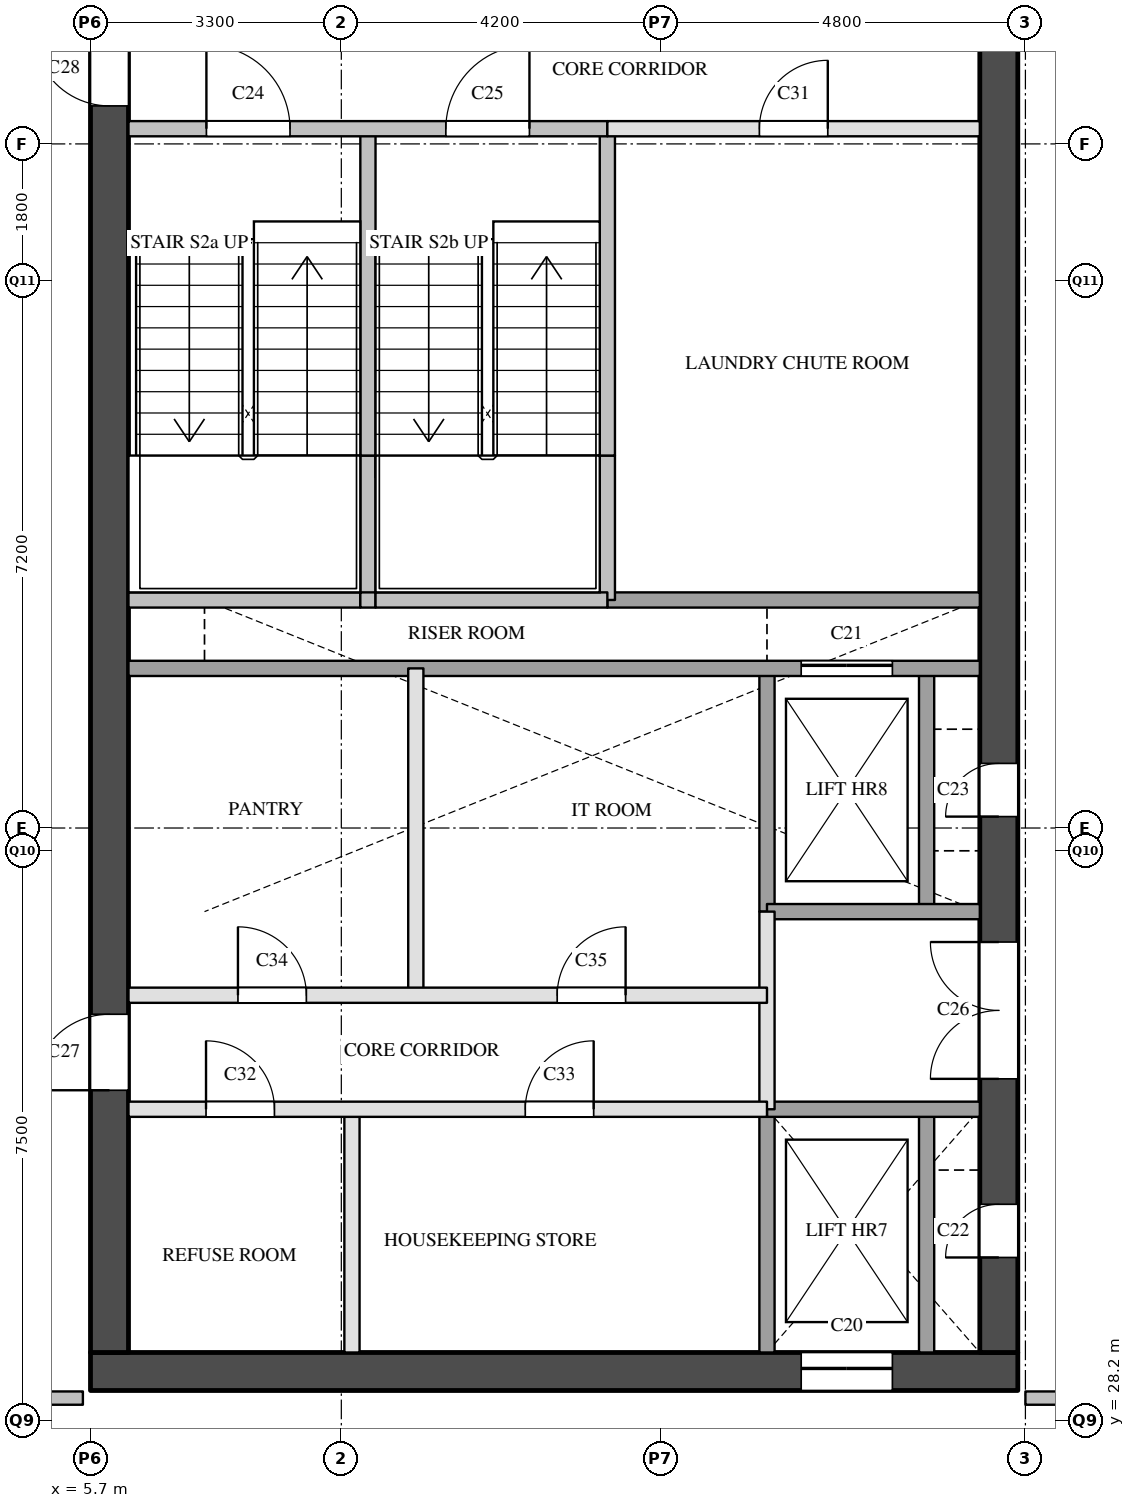
"""IFC4 building model, lengths in metres.
Left out: names, types, materials, properties, quantities, classifications, styles, units other than length and angle.
Written with IfcOpenShell. Run it as: python <this file> out.ifc"""

import sys

from ifc_helpers import new_model, si_unit, direction, frame, frame_2d, origin, place, context, subcontext, project, spatial, rectangle, extrude, element, fill, save


model = new_model("IFC4")
c1 = context("Model", 3, precision=1e-05, world=origin(), true_north=direction((0.0, 1.0)))
c2 = subcontext(c1, "Body", "Model", "MODEL_VIEW")
j1 = project(units=[si_unit("LENGTHUNIT", "METRE"), si_unit("PLANEANGLEUNIT", "RADIAN")], contexts=[c1])
p1 = place(None, origin())
s1 = spatial("IfcSite", under=j1, at=p1, CompositionType="ELEMENT")
p2 = place(p1, origin())
s2 = spatial("IfcBuilding", under=s1, at=p2, CompositionType="ELEMENT")
p3 = place(p2, frame((0.0, 0.0, 181.7)))
s3 = spatial("IfcBuildingStorey", under=s2, at=p3, CompositionType="ELEMENT", Elevation=181.7)
p4 = place(p3, frame((5.7, 28.85, 0.0), z_axis=(0.0, 0.0, 1.0), x_axis=(1.0, 0.0, 0.0)))
e1 = element("IfcWall", 1, at=p4, inside=s3, PredefinedType="SHEAR", context=c2, shape_type="SweptSolid", body=[
    extrude(rectangle(XDim=12.2, YDim=0.5, at=frame_2d((6.1, 0.0))), origin(), (0.0, 0.0, 1.0), 3.6),
])
p5 = place(p4, frame((9.35, 0.0, 0.0)))
e2 = element("IfcOpeningElement", 2, at=p5, cuts=e1, PredefinedType="OPENING", context=c2, shape_type="SweptSolid", body=[
    extrude(rectangle(XDim=1.2, YDim=2.1, at=frame_2d((0.6, 1.05))), frame((0.0, 0.26, 0.0), z_axis=(0.0, -1.0, 0.0), x_axis=(1.0, 0.0, 0.0)), (0.0, 0.0, 1.0), 0.52),
])
p6 = place(p3, frame((5.95, 29.1, 0.0), z_axis=(0.0, 0.0, 1.0), x_axis=(0.0, 1.0, 0.0)))
e3 = element("IfcWall", 3, at=p6, inside=s3, PredefinedType="SHEAR", context=c2, shape_type="SweptSolid", body=[
    extrude(rectangle(XDim=20.3, YDim=0.5, at=frame_2d((10.15, 0.0))), origin(), (0.0, 0.0, 1.0), 3.6),
])
p7 = place(p6, frame((3.45, 0.0, 0.0)))
e4 = element("IfcOpeningElement", 4, at=p7, cuts=e3, PredefinedType="OPENING", context=c2, shape_type="SweptSolid", body=[
    extrude(rectangle(XDim=1.0, YDim=2.1, at=frame_2d((0.5, 1.05))), frame((0.0, 0.26, 0.0), z_axis=(0.0, -1.0, 0.0), x_axis=(1.0, 0.0, 0.0)), (0.0, 0.0, 1.0), 0.52),
])
p8 = place(p6, frame((16.4, 0.0, 0.0)))
e5 = element("IfcOpeningElement", 5, at=p8, cuts=e3, PredefinedType="OPENING", context=c2, shape_type="SweptSolid", body=[
    extrude(rectangle(XDim=1.0, YDim=2.1, at=frame_2d((0.5, 1.05))), frame((0.0, 0.26, 0.0), z_axis=(0.0, -1.0, 0.0), x_axis=(1.0, 0.0, 0.0)), (0.0, 0.0, 1.0), 0.52),
])
p9 = place(p3, frame((17.65, 29.1, 0.0), z_axis=(0.0, 0.0, 1.0), x_axis=(0.0, 1.0, 0.0)))
e6 = element("IfcWall", 6, at=p9, inside=s3, PredefinedType="SHEAR", context=c2, shape_type="SweptSolid", body=[
    extrude(rectangle(XDim=20.3, YDim=0.5, at=frame_2d((10.15, 0.0))), origin(), (0.0, 0.0, 1.0), 3.6),
])
p10 = place(p9, frame((1.25, 0.0, 0.0)))
e7 = element("IfcOpeningElement", 7, at=p10, cuts=e6, PredefinedType="OPENING", context=c2, shape_type="SweptSolid", body=[
    extrude(rectangle(XDim=0.7, YDim=2.1, at=frame_2d((0.35, 1.05))), frame((0.0, 0.26, 0.0), z_axis=(0.0, -1.0, 0.0), x_axis=(1.0, 0.0, 0.0)), (0.0, 0.0, 1.0), 0.52),
])
p11 = place(p9, frame((7.05, 0.0, 0.0)))
e8 = element("IfcOpeningElement", 8, at=p11, cuts=e6, PredefinedType="OPENING", context=c2, shape_type="SweptSolid", body=[
    extrude(rectangle(XDim=0.7, YDim=2.1, at=frame_2d((0.35, 1.05))), frame((0.0, 0.26, 0.0), z_axis=(0.0, -1.0, 0.0), x_axis=(1.0, 0.0, 0.0)), (0.0, 0.0, 1.0), 0.52),
])
p12 = place(p9, frame((3.6, 0.0, 0.0)))
e9 = element("IfcOpeningElement", 9, at=p12, cuts=e6, PredefinedType="OPENING", context=c2, shape_type="SweptSolid", body=[
    extrude(rectangle(XDim=1.8, YDim=2.1, at=frame_2d((0.9, 1.05))), frame((0.0, 0.26, 0.0), z_axis=(0.0, -1.0, 0.0), x_axis=(1.0, 0.0, 0.0)), (0.0, 0.0, 1.0), 0.52),
])
p13 = place(p3, frame((9.14, 29.1, 0.0), z_axis=(0.0, 0.0, 1.0), x_axis=(0.0, 1.0, 0.0)))
e10 = element("IfcWall", 10, at=p13, inside=s3, PredefinedType="PARTITIONING", context=c2, shape_type="SweptSolid", body=[
    extrude(rectangle(XDim=3.2, YDim=0.2, at=frame_2d((1.6, 0.0))), origin(), (0.0, 0.0, 1.0), 3.6),
])
p14 = place(p3, frame((9.35, 39.0, 0.0), z_axis=(0.0, 0.0, 1.0), x_axis=(0.0, 1.0, 0.0)))
e11 = element("IfcWall", 11, at=p14, inside=s3, PredefinedType="SOLIDWALL", context=c2, shape_type="SweptSolid", body=[
    extrude(rectangle(XDim=1.9, YDim=0.2, at=frame_2d((0.95, 0.0))), origin(), (0.0, 0.0, 1.0), 3.6),
])
p15 = place(p3, frame((9.35, 40.9, 0.0), z_axis=(0.0, 0.0, 1.0), x_axis=(0.0, 1.0, 0.0)))
e12 = element("IfcWall", 12, at=p15, inside=s3, PredefinedType="SOLIDWALL", context=c2, shape_type="SweptSolid", body=[
    extrude(rectangle(XDim=4.3, YDim=0.2, at=frame_2d((2.15, 0.0))), origin(), (0.0, 0.0, 1.0), 3.6),
])
p16 = place(p3, frame((9.98, 33.8, 0.0), z_axis=(0.0, 0.0, 1.0), x_axis=(0.0, 1.0, 0.0)))
e13 = element("IfcWall", 13, at=p16, inside=s3, PredefinedType="PARTITIONING", context=c2, shape_type="SweptSolid", body=[
    extrude(rectangle(XDim=4.3, YDim=0.2, at=frame_2d((2.15, 0.0))), origin(), (0.0, 0.0, 1.0), 3.6),
])
p17 = place(p3, frame((12.5, 39.0, 0.0), z_axis=(0.0, 0.0, 1.0), x_axis=(0.0, 1.0, 0.0)))
e14 = element("IfcWall", 14, at=p17, inside=s3, PredefinedType="SOLIDWALL", context=c2, shape_type="SweptSolid", body=[
    extrude(rectangle(XDim=1.9, YDim=0.2, at=frame_2d((0.95, 0.0))), origin(), (0.0, 0.0, 1.0), 3.6),
])
p18 = place(p3, frame((12.5, 40.9, 0.0), z_axis=(0.0, 0.0, 1.0), x_axis=(0.0, 1.0, 0.0)))
e15 = element("IfcWall", 15, at=p18, inside=s3, PredefinedType="SOLIDWALL", context=c2, shape_type="SweptSolid", body=[
    extrude(rectangle(XDim=4.3, YDim=0.2, at=frame_2d((2.15, 0.0))), origin(), (0.0, 0.0, 1.0), 3.6),
])
p19 = place(p3, frame((14.6, 32.3, 0.0), z_axis=(0.0, 0.0, 1.0), x_axis=(0.0, 1.0, 0.0)))
e16 = element("IfcWall", 16, at=p19, inside=s3, PredefinedType="PARTITIONING", context=c2, shape_type="SweptSolid", body=[
    extrude(rectangle(XDim=2.6, YDim=0.2, at=frame_2d((1.3, 0.0))), origin(), (0.0, 0.0, 1.0), 3.6),
])
p20 = place(p3, frame((14.6, 29.1, 0.0), z_axis=(0.0, 0.0, 1.0), x_axis=(0.0, 1.0, 0.0)))
e17 = element("IfcWall", 17, at=p20, inside=s3, PredefinedType="SOLIDWALL", context=c2, shape_type="SweptSolid", body=[
    extrude(rectangle(XDim=3.2, YDim=0.2, at=frame_2d((1.6, 0.0))), origin(), (0.0, 0.0, 1.0), 3.6),
])
p21 = place(p3, frame((14.6, 34.9, 0.0), z_axis=(0.0, 0.0, 1.0), x_axis=(0.0, 1.0, 0.0)))
e18 = element("IfcWall", 18, at=p21, inside=s3, PredefinedType="SOLIDWALL", context=c2, shape_type="SweptSolid", body=[
    extrude(rectangle(XDim=3.2, YDim=0.2, at=frame_2d((1.6, 0.0))), origin(), (0.0, 0.0, 1.0), 3.6),
])
p22 = place(p3, frame((16.7, 29.1, 0.0), z_axis=(0.0, 0.0, 1.0), x_axis=(0.0, 1.0, 0.0)))
e19 = element("IfcWall", 19, at=p22, inside=s3, PredefinedType="SOLIDWALL", context=c2, shape_type="SweptSolid", body=[
    extrude(rectangle(XDim=3.2, YDim=0.2, at=frame_2d((1.6, 0.0))), origin(), (0.0, 0.0, 1.0), 3.6),
])
p23 = place(p3, frame((16.7, 34.9, 0.0), z_axis=(0.0, 0.0, 1.0), x_axis=(0.0, 1.0, 0.0)))
e20 = element("IfcWall", 20, at=p23, inside=s3, PredefinedType="SOLIDWALL", context=c2, shape_type="SweptSolid", body=[
    extrude(rectangle(XDim=3.2, YDim=0.2, at=frame_2d((1.6, 0.0))), origin(), (0.0, 0.0, 1.0), 3.6),
])
p24 = place(p3, frame((6.2, 32.3, 0.0), z_axis=(0.0, 0.0, 1.0), x_axis=(1.0, 0.0, 0.0)))
e21 = element("IfcWall", 21, at=p24, inside=s3, PredefinedType="PARTITIONING", context=c2, shape_type="SweptSolid", body=[
    extrude(rectangle(XDim=8.4, YDim=0.2, at=frame_2d((4.2, 0.0))), origin(), (0.0, 0.0, 1.0), 3.6),
])
p25 = place(p24, frame((1.02, 0.0, 0.0)))
e22 = element("IfcOpeningElement", 22, at=p25, cuts=e21, PredefinedType="OPENING", context=c2, shape_type="SweptSolid", body=[
    extrude(rectangle(XDim=0.9, YDim=2.1, at=frame_2d((0.45, 1.05))), frame((0.0, 0.11, 0.0), z_axis=(0.0, -1.0, 0.0), x_axis=(1.0, 0.0, 0.0)), (0.0, 0.0, 1.0), 0.22),
])
p26 = place(p24, frame((5.22, 0.0, 0.0)))
e23 = element("IfcOpeningElement", 23, at=p26, cuts=e21, PredefinedType="OPENING", context=c2, shape_type="SweptSolid", body=[
    extrude(rectangle(XDim=0.9, YDim=2.1, at=frame_2d((0.45, 1.05))), frame((0.0, 0.11, 0.0), z_axis=(0.0, -1.0, 0.0), x_axis=(1.0, 0.0, 0.0)), (0.0, 0.0, 1.0), 0.22),
])
p27 = place(p3, frame((14.6, 32.3, 0.0), z_axis=(0.0, 0.0, 1.0), x_axis=(1.0, 0.0, 0.0)))
e24 = element("IfcWall", 24, at=p27, inside=s3, PredefinedType="SOLIDWALL", context=c2, shape_type="SweptSolid", body=[
    extrude(rectangle(XDim=2.8, YDim=0.2, at=frame_2d((1.4, 0.0))), origin(), (0.0, 0.0, 1.0), 3.6),
])
p28 = place(p3, frame((6.2, 33.8, 0.0), z_axis=(0.0, 0.0, 1.0), x_axis=(1.0, 0.0, 0.0)))
e25 = element("IfcWall", 25, at=p28, inside=s3, PredefinedType="PARTITIONING", context=c2, shape_type="SweptSolid", body=[
    extrude(rectangle(XDim=8.4, YDim=0.2, at=frame_2d((4.2, 0.0))), origin(), (0.0, 0.0, 1.0), 3.6),
])
p29 = place(p28, frame((1.44, 0.0, 0.0)))
e26 = element("IfcOpeningElement", 26, at=p29, cuts=e25, PredefinedType="OPENING", context=c2, shape_type="SweptSolid", body=[
    extrude(rectangle(XDim=0.9, YDim=2.1, at=frame_2d((0.45, 1.05))), frame((0.0, 0.11, 0.0), z_axis=(0.0, -1.0, 0.0), x_axis=(1.0, 0.0, 0.0)), (0.0, 0.0, 1.0), 0.22),
])
p30 = place(p28, frame((5.64, 0.0, 0.0)))
e27 = element("IfcOpeningElement", 27, at=p30, cuts=e25, PredefinedType="OPENING", context=c2, shape_type="SweptSolid", body=[
    extrude(rectangle(XDim=0.9, YDim=2.1, at=frame_2d((0.45, 1.05))), frame((0.0, 0.11, 0.0), z_axis=(0.0, -1.0, 0.0), x_axis=(1.0, 0.0, 0.0)), (0.0, 0.0, 1.0), 0.22),
])
p31 = place(p3, frame((14.6, 34.9, 0.0), z_axis=(0.0, 0.0, 1.0), x_axis=(1.0, 0.0, 0.0)))
e28 = element("IfcWall", 28, at=p31, inside=s3, PredefinedType="SOLIDWALL", context=c2, shape_type="SweptSolid", body=[
    extrude(rectangle(XDim=2.8, YDim=0.2, at=frame_2d((1.4, 0.0))), origin(), (0.0, 0.0, 1.0), 3.6),
])
p32 = place(p3, frame((6.2, 38.1, 0.0), z_axis=(0.0, 0.0, 1.0), x_axis=(1.0, 0.0, 0.0)))
e29 = element("IfcWall", 29, at=p32, inside=s3, PredefinedType="SOLIDWALL", context=c2, shape_type="SweptSolid", body=[
    extrude(rectangle(XDim=11.2, YDim=0.2, at=frame_2d((5.6, 0.0))), origin(), (0.0, 0.0, 1.0), 3.6),
])
p33 = place(p32, frame((8.85, 0.0, 0.0)))
e30 = element("IfcOpeningElement", 30, at=p33, cuts=e29, PredefinedType="OPENING", context=c2, shape_type="SweptSolid", body=[
    extrude(rectangle(XDim=1.2, YDim=2.1, at=frame_2d((0.6, 1.05))), frame((0.0, 0.11, 0.0), z_axis=(0.0, -1.0, 0.0), x_axis=(1.0, 0.0, 0.0)), (0.0, 0.0, 1.0), 0.22),
])
p34 = place(p3, frame((12.5, 39.0, 0.0), z_axis=(0.0, 0.0, 1.0), x_axis=(1.0, 0.0, 0.0)))
e31 = element("IfcWall", 31, at=p34, inside=s3, PredefinedType="SOLIDWALL", context=c2, shape_type="SweptSolid", body=[
    extrude(rectangle(XDim=4.9, YDim=0.2, at=frame_2d((2.45, 0.0))), origin(), (0.0, 0.0, 1.0), 3.6),
])
p35 = place(p3, frame((6.2, 39.0, 0.0), z_axis=(0.0, 0.0, 1.0), x_axis=(1.0, 0.0, 0.0)))
e32 = element("IfcWall", 32, at=p35, inside=s3, PredefinedType="SOLIDWALL", context=c2, shape_type="SweptSolid", body=[
    extrude(rectangle(XDim=3.05, YDim=0.2, at=frame_2d((1.525, 0.0))), origin(), (0.0, 0.0, 1.0), 3.6),
])
p36 = place(p3, frame((9.25, 39.0, 0.0), z_axis=(0.0, 0.0, 1.0), x_axis=(1.0, 0.0, 0.0)))
e33 = element("IfcWall", 33, at=p36, inside=s3, PredefinedType="SOLIDWALL", context=c2, shape_type="SweptSolid", body=[
    extrude(rectangle(XDim=0.2, YDim=0.2, at=frame_2d((0.1, 0.0))), origin(), (0.0, 0.0, 1.0), 3.6),
])
p37 = place(p3, frame((9.45, 39.0, 0.0), z_axis=(0.0, 0.0, 1.0), x_axis=(1.0, 0.0, 0.0)))
e34 = element("IfcWall", 34, at=p37, inside=s3, PredefinedType="SOLIDWALL", context=c2, shape_type="SweptSolid", body=[
    extrude(rectangle(XDim=3.05, YDim=0.2, at=frame_2d((1.525, 0.0))), origin(), (0.0, 0.0, 1.0), 3.6),
])
p38 = place(p3, frame((12.5, 45.2, 0.0), z_axis=(0.0, 0.0, 1.0), x_axis=(1.0, 0.0, 0.0)))
e35 = element("IfcWall", 35, at=p38, inside=s3, PredefinedType="PARTITIONING", context=c2, shape_type="SweptSolid", body=[
    extrude(rectangle(XDim=4.9, YDim=0.2, at=frame_2d((2.45, 0.0))), origin(), (0.0, 0.0, 1.0), 3.6),
])
p39 = place(p38, frame((2.0, 0.0, 0.0)))
e36 = element("IfcOpeningElement", 36, at=p39, cuts=e35, PredefinedType="OPENING", context=c2, shape_type="SweptSolid", body=[
    extrude(rectangle(XDim=0.9, YDim=2.1, at=frame_2d((0.45, 1.05))), frame((0.0, 0.11, 0.0), z_axis=(0.0, -1.0, 0.0), x_axis=(1.0, 0.0, 0.0)), (0.0, 0.0, 1.0), 0.22),
])
p40 = place(p3, frame((6.2, 45.2, 0.0), z_axis=(0.0, 0.0, 1.0), x_axis=(1.0, 0.0, 0.0)))
e37 = element("IfcWall", 37, at=p40, inside=s3, PredefinedType="SOLIDWALL", context=c2, shape_type="SweptSolid", body=[
    extrude(rectangle(XDim=6.3, YDim=0.2, at=frame_2d((3.15, 0.0))), origin(), (0.0, 0.0, 1.0), 3.6),
])
p41 = place(p40, frame((1.025, 0.0, 0.0)))
e38 = element("IfcOpeningElement", 38, at=p41, cuts=e37, PredefinedType="OPENING", context=c2, shape_type="SweptSolid", body=[
    extrude(rectangle(XDim=1.1, YDim=2.1, at=frame_2d((0.55, 1.05))), frame((0.0, 0.11, 0.0), z_axis=(0.0, -1.0, 0.0), x_axis=(1.0, 0.0, 0.0)), (0.0, 0.0, 1.0), 0.22),
])
p42 = place(p40, frame((4.175, 0.0, 0.0)))
e39 = element("IfcOpeningElement", 39, at=p42, cuts=e37, PredefinedType="OPENING", context=c2, shape_type="SweptSolid", body=[
    extrude(rectangle(XDim=1.1, YDim=2.1, at=frame_2d((0.55, 1.05))), frame((0.0, 0.11, 0.0), z_axis=(0.0, -1.0, 0.0), x_axis=(1.0, 0.0, 0.0)), (0.0, 0.0, 1.0), 0.22),
])
for number, where, z_axis, x_axis in (
    (40, (4.1, 28.5, 0.0), (0.0, 0.0, 1.0), (1.0, 0.0, 0.0)),
    (41, (18.0, 28.5, 0.0), (0.0, 0.0, 1.0), (1.0, 0.0, 0.0)),
):
    element("IfcWall", number, at=place(p3, frame(where, z_axis=z_axis, x_axis=x_axis)), inside=s3, PredefinedType="PARTITIONING", context=c2, shape_type="SweptSolid", body=[
        extrude(rectangle(XDim=1.5, YDim=0.175, at=frame_2d((0.75, 0.0))), origin(), (0.0, 0.0, 1.0), 3.6),
    ])
p43 = place(p5, origin())
e42 = element("IfcDoor", 42, at=p43, inside=s3, OperationType="SLIDING_TO_LEFT", PredefinedType="DOOR", context=c2, shape_type="SweptSolid", body=[
    extrude(rectangle(XDim=1.2, YDim=2.1, at=frame_2d((0.6, 1.05))), frame((0.0, 0.025, 0.0), z_axis=(0.0, -1.0, 0.0), x_axis=(1.0, 0.0, 0.0)), (0.0, 0.0, 1.0), 0.05),
])
fill(e2, e42)
p44 = place(p33, origin())
e43 = element("IfcDoor", 43, at=p44, inside=s3, OperationType="SLIDING_TO_LEFT", PredefinedType="DOOR", context=c2, shape_type="SweptSolid", body=[
    extrude(rectangle(XDim=1.2, YDim=2.1, at=frame_2d((0.6, 1.05))), frame((0.0, 0.025, 0.0), z_axis=(0.0, -1.0, 0.0), x_axis=(1.0, 0.0, 0.0)), (0.0, 0.0, 1.0), 0.05),
])
fill(e30, e43)
p45 = place(p10, origin())
e44 = element("IfcDoor", 44, at=p45, inside=s3, OperationType="SINGLE_SWING_LEFT", PredefinedType="DOOR", context=c2, shape_type="SweptSolid", body=[
    extrude(rectangle(XDim=0.7, YDim=2.1, at=frame_2d((0.35, 1.05))), frame((0.0, 0.025, 0.0), z_axis=(0.0, -1.0, 0.0), x_axis=(1.0, 0.0, 0.0)), (0.0, 0.0, 1.0), 0.05),
])
fill(e7, e44)
p46 = place(p11, origin())
e45 = element("IfcDoor", 45, at=p46, inside=s3, OperationType="SINGLE_SWING_LEFT", PredefinedType="DOOR", context=c2, shape_type="SweptSolid", body=[
    extrude(rectangle(XDim=0.7, YDim=2.1, at=frame_2d((0.35, 1.05))), frame((0.0, 0.025, 0.0), z_axis=(0.0, -1.0, 0.0), x_axis=(1.0, 0.0, 0.0)), (0.0, 0.0, 1.0), 0.05),
])
fill(e8, e45)
p47 = place(p41, origin())
e46 = element("IfcDoor", 46, at=p47, inside=s3, OperationType="SINGLE_SWING_LEFT", PredefinedType="DOOR", context=c2, shape_type="SweptSolid", body=[
    extrude(rectangle(XDim=1.1, YDim=2.1, at=frame_2d((0.55, 1.05))), frame((0.0, 0.025, 0.0), z_axis=(0.0, -1.0, 0.0), x_axis=(1.0, 0.0, 0.0)), (0.0, 0.0, 1.0), 0.05),
])
fill(e38, e46)
p48 = place(p42, origin())
e47 = element("IfcDoor", 47, at=p48, inside=s3, OperationType="SINGLE_SWING_RIGHT", PredefinedType="DOOR", context=c2, shape_type="SweptSolid", body=[
    extrude(rectangle(XDim=1.1, YDim=2.1, at=frame_2d((0.55, 1.05))), frame((0.0, 0.025, 0.0), z_axis=(0.0, -1.0, 0.0), x_axis=(1.0, 0.0, 0.0)), (0.0, 0.0, 1.0), 0.05),
])
fill(e39, e47)
p49 = place(p12, origin())
e48 = element("IfcDoor", 48, at=p49, inside=s3, OperationType="DOUBLE_DOOR_SINGLE_SWING", PredefinedType="DOOR", context=c2, shape_type="SweptSolid", body=[
    extrude(rectangle(XDim=1.8, YDim=2.1, at=frame_2d((0.9, 1.05))), frame((0.0, 0.025, 0.0), z_axis=(0.0, -1.0, 0.0), x_axis=(1.0, 0.0, 0.0)), (0.0, 0.0, 1.0), 0.05),
])
fill(e9, e48)
p50 = place(p7, origin())
e49 = element("IfcDoor", 49, at=p50, inside=s3, OperationType="SINGLE_SWING_LEFT", PredefinedType="DOOR", context=c2, shape_type="SweptSolid", body=[
    extrude(rectangle(XDim=1.0, YDim=2.1, at=frame_2d((0.5, 1.05))), frame((0.0, 0.025, 0.0), z_axis=(0.0, -1.0, 0.0), x_axis=(1.0, 0.0, 0.0)), (0.0, 0.0, 1.0), 0.05),
])
fill(e4, e49)
p51 = place(p8, origin())
e50 = element("IfcDoor", 50, at=p51, inside=s3, OperationType="SINGLE_SWING_RIGHT", PredefinedType="DOOR", context=c2, shape_type="SweptSolid", body=[
    extrude(rectangle(XDim=1.0, YDim=2.1, at=frame_2d((0.5, 1.05))), frame((0.0, 0.025, 0.0), z_axis=(0.0, -1.0, 0.0), x_axis=(1.0, 0.0, 0.0)), (0.0, 0.0, 1.0), 0.05),
])
fill(e5, e50)
p52 = place(p39, origin())
e51 = element("IfcDoor", 51, at=p52, inside=s3, OperationType="SINGLE_SWING_RIGHT", PredefinedType="DOOR", context=c2, shape_type="SweptSolid", body=[
    extrude(rectangle(XDim=0.9, YDim=2.1, at=frame_2d((0.45, 1.05))), frame((0.0, 0.025, 0.0), z_axis=(0.0, -1.0, 0.0), x_axis=(1.0, 0.0, 0.0)), (0.0, 0.0, 1.0), 0.05),
])
fill(e36, e51)
p53 = place(p25, origin())
e52 = element("IfcDoor", 52, at=p53, inside=s3, OperationType="SINGLE_SWING_LEFT", PredefinedType="DOOR", context=c2, shape_type="SweptSolid", body=[
    extrude(rectangle(XDim=0.9, YDim=2.1, at=frame_2d((0.45, 1.05))), frame((0.0, 0.025, 0.0), z_axis=(0.0, -1.0, 0.0), x_axis=(1.0, 0.0, 0.0)), (0.0, 0.0, 1.0), 0.05),
])
fill(e22, e52)
p54 = place(p26, origin())
e53 = element("IfcDoor", 53, at=p54, inside=s3, OperationType="SINGLE_SWING_RIGHT", PredefinedType="DOOR", context=c2, shape_type="SweptSolid", body=[
    extrude(rectangle(XDim=0.9, YDim=2.1, at=frame_2d((0.45, 1.05))), frame((0.0, 0.025, 0.0), z_axis=(0.0, -1.0, 0.0), x_axis=(1.0, 0.0, 0.0)), (0.0, 0.0, 1.0), 0.05),
])
fill(e23, e53)
p55 = place(p29, origin())
e54 = element("IfcDoor", 54, at=p55, inside=s3, OperationType="SINGLE_SWING_LEFT", PredefinedType="DOOR", context=c2, shape_type="SweptSolid", body=[
    extrude(rectangle(XDim=0.9, YDim=2.1, at=frame_2d((0.45, 1.05))), frame((0.0, 0.025, 0.0), z_axis=(0.0, -1.0, 0.0), x_axis=(1.0, 0.0, 0.0)), (0.0, 0.0, 1.0), 0.05),
])
fill(e26, e54)
p56 = place(p30, origin())
e55 = element("IfcDoor", 55, at=p56, inside=s3, OperationType="SINGLE_SWING_RIGHT", PredefinedType="DOOR", context=c2, shape_type="SweptSolid", body=[
    extrude(rectangle(XDim=0.9, YDim=2.1, at=frame_2d((0.45, 1.05))), frame((0.0, 0.025, 0.0), z_axis=(0.0, -1.0, 0.0), x_axis=(1.0, 0.0, 0.0)), (0.0, 0.0, 1.0), 0.05),
])
fill(e27, e55)
save(model, sys.argv[1])
